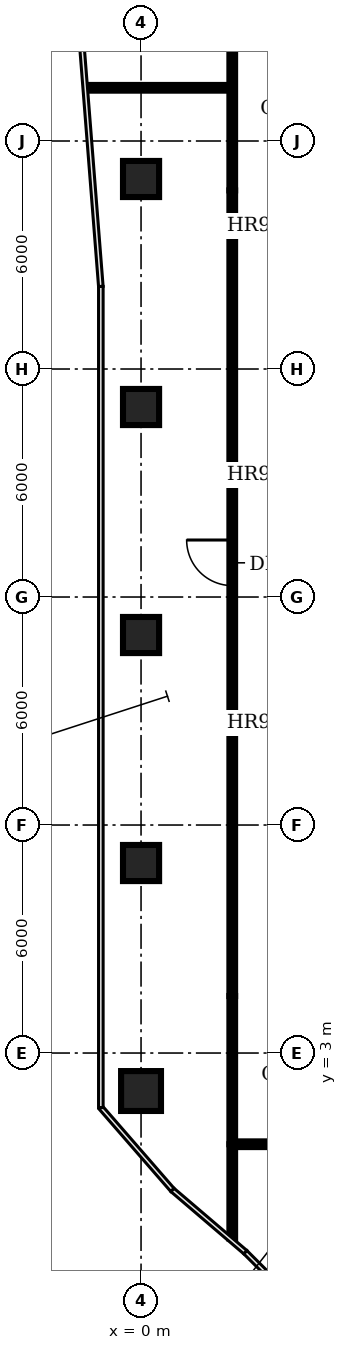
"""IFC4 building model, lengths in metres.
Left out: names, types, materials, properties, quantities, classifications, styles, units other than length and angle.
Written with IfcOpenShell. Run it as: python <this file> out.ifc"""

import sys

from ifc_helpers import new_model, si_unit, direction, frame, frame_2d, origin, origin_2d, place, context, subcontext, project, spatial, rectangle, circle, extrude, element, fill, save


model = new_model("IFC4")
c1 = context("Model", 3, precision=1e-05, world=origin(), true_north=direction((0.0, 1.0)))
c2 = subcontext(c1, "Body", "Model", "MODEL_VIEW")
j1 = project(units=[si_unit("LENGTHUNIT", "METRE"), si_unit("PLANEANGLEUNIT", "RADIAN")], contexts=[c1])
p1 = place(None, origin())
s1 = spatial("IfcSite", under=j1, at=p1, CompositionType="ELEMENT")
p2 = place(p1, origin())
s2 = spatial("IfcBuilding", under=s1, at=p2, CompositionType="ELEMENT")
p3 = place(p2, frame((0.0, 0.0, 71.0)))
s3 = spatial("IfcBuildingStorey", under=s2, at=p3, CompositionType="ELEMENT", Elevation=71.0)
p4 = place(p3, frame((0.0, 2.0, 0.0), z_axis=(0.0, 0.0, 1.0), x_axis=(1.0, 0.0, 0.0)))
e1 = element("IfcColumn", 1, at=p4, inside=s3, PredefinedType="COLUMN", context=c2, shape_type="SweptSolid", body=[
    extrude(circle(Radius=0.525, at=origin_2d()), origin(), (0.0, 0.0, 1.0), 3.85),
])
for number, where, z_axis, x_axis in (
    (2, (0.0, 8.0, 0.0), (0.0, 0.0, 1.0), (1.0, 0.0, 0.0)),
    (3, (0.0, 14.0, 0.0), (0.0, 0.0, 1.0), (1.0, 0.0, 0.0)),
    (4, (0.0, 20.0, 0.0), (0.0, 0.0, 1.0), (1.0, 0.0, 0.0)),
    (5, (0.0, 26.0, 0.0), (0.0, 0.0, 1.0), (1.0, 0.0, 0.0)),
):
    element("IfcColumn", number, at=place(p3, frame(where, z_axis=z_axis, x_axis=x_axis)), inside=s3, PredefinedType="COLUMN", context=c2, shape_type="SweptSolid", body=[
        extrude(rectangle(XDim=0.95, YDim=0.95, at=origin_2d()), origin(), (0.0, 0.0, 1.0), 3.85),
    ])
p5 = place(p3, frame((-1.42, 28.4, 0.0), z_axis=(0.0, 0.0, 1.0), x_axis=(1.0, 0.0, 0.0)))
e6 = element("IfcWall", 6, at=p5, inside=s3, PredefinedType="PARTITIONING", context=c2, shape_type="SweptSolid", body=[
    extrude(rectangle(XDim=3.82, YDim=0.15, at=frame_2d((1.91, 0.0))), origin(), (0.0, 0.0, 1.0), 2.83),
])
p6 = place(p3, frame((2.4, -1.88, 0.0), z_axis=(0.0, 0.0, 1.0), x_axis=(0.0, 1.0, 0.0)))
e7 = element("IfcWall", 7, at=p6, inside=s3, PredefinedType="PARTITIONING", context=c2, shape_type="SweptSolid", body=[
    extrude(rectangle(XDim=2.48, YDim=0.15, at=frame_2d((1.24, 0.0))), origin(), (0.0, 0.0, 1.0), 2.83),
])
p7 = place(p3, frame((2.4, 0.6, 0.0), z_axis=(0.0, 0.0, 1.0), x_axis=(0.0, 1.0, 0.0)))
e8 = element("IfcWall", 8, at=p7, inside=s3, PredefinedType="PARTITIONING", context=c2, shape_type="SweptSolid", body=[
    extrude(rectangle(XDim=3.9, YDim=0.15, at=frame_2d((1.95, 0.0))), origin(), (0.0, 0.0, 1.0), 2.83),
])
p8 = place(p3, frame((2.4, 4.5, 0.0), z_axis=(0.0, 0.0, 1.0), x_axis=(0.0, 1.0, 0.0)))
e9 = element("IfcWall", 9, at=p8, inside=s3, PredefinedType="PARTITIONING", context=c2, shape_type="SweptSolid", body=[
    extrude(rectangle(XDim=21.2, YDim=0.15, at=frame_2d((10.6, 0.0))), origin(), (0.0, 0.0, 1.0), 2.83),
])
p9 = place(p8, frame((10.8, 0.0, 0.0)))
e10 = element("IfcOpeningElement", 10, at=p9, cuts=e9, PredefinedType="OPENING", context=c2, shape_type="SweptSolid", body=[
    extrude(rectangle(XDim=1.2, YDim=2.1, at=frame_2d((0.6, 1.05))), frame((0.0, 0.085, 0.0), z_axis=(0.0, -1.0, 0.0), x_axis=(1.0, 0.0, 0.0)), (0.0, 0.0, 1.0), 0.17),
])
p10 = place(p3, frame((2.4, 25.7, 0.0), z_axis=(0.0, 0.0, 1.0), x_axis=(0.0, 1.0, 0.0)))
e11 = element("IfcWall", 11, at=p10, inside=s3, PredefinedType="PARTITIONING", context=c2, shape_type="SweptSolid", body=[
    extrude(rectangle(XDim=3.9, YDim=0.15, at=frame_2d((1.95, 0.0))), origin(), (0.0, 0.0, 1.0), 2.83),
])
p11 = place(p3, frame((27.6, 0.6, 0.0), z_axis=(0.0, 0.0, 1.0), x_axis=(-1.0, 0.0, 0.0)))
e12 = element("IfcWall", 12, at=p11, inside=s3, PredefinedType="PARTITIONING", context=c2, shape_type="SweptSolid", body=[
    extrude(rectangle(XDim=25.2, YDim=0.15, at=frame_2d((12.6, 0.0))), origin(), (0.0, 0.0, 1.0), 2.83),
])
p12 = place(p11, frame((12.1, 0.0, 0.0)))
e13 = element("IfcOpeningElement", 13, at=p12, cuts=e12, PredefinedType="OPENING", context=c2, shape_type="SweptSolid", body=[
    extrude(rectangle(XDim=1.2, YDim=2.1, at=frame_2d((0.6, 1.05))), frame((0.0, 0.085, 0.0), z_axis=(0.0, -1.0, 0.0), x_axis=(1.0, 0.0, 0.0)), (0.0, 0.0, 1.0), 0.17),
])
p13 = place(p9, origin())
e14 = element("IfcDoor", 14, at=p13, inside=s3, OperationType="SINGLE_SWING_RIGHT", PredefinedType="DOOR", context=c2, shape_type="SweptSolid", body=[
    extrude(rectangle(XDim=1.2, YDim=2.1, at=frame_2d((0.6, 1.05))), frame((0.0, 0.025, 0.0), z_axis=(0.0, -1.0, 0.0), x_axis=(1.0, 0.0, 0.0)), (0.0, 0.0, 1.0), 0.05),
])
fill(e10, e14)
save(model, sys.argv[1])
